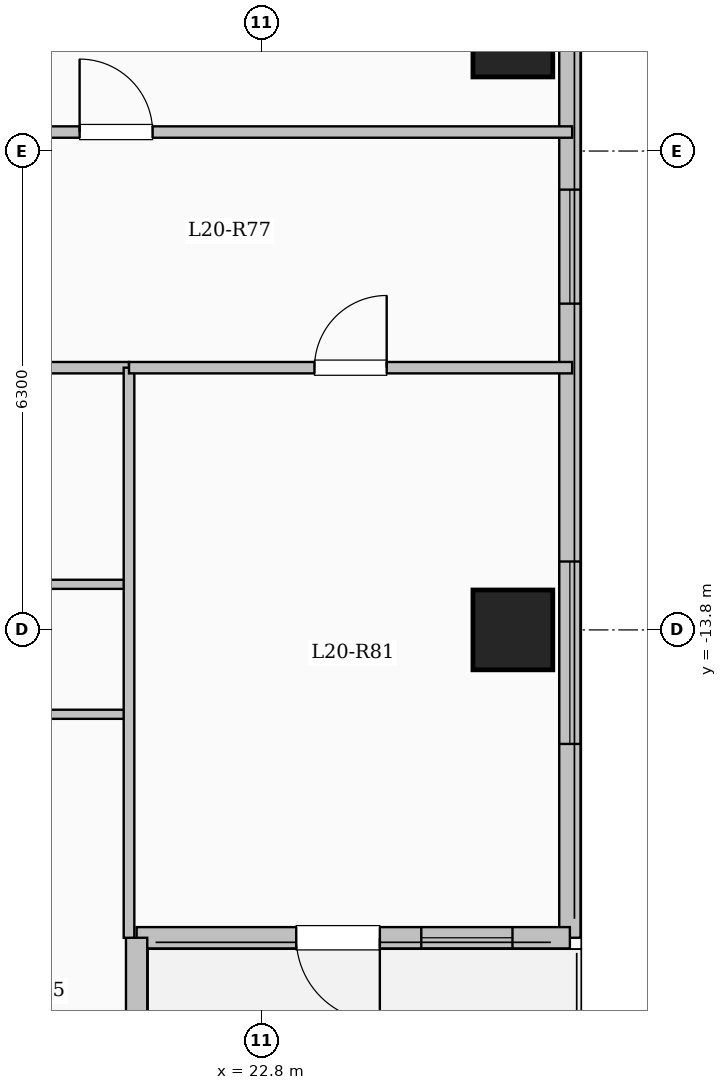
"""IFC4 building model, lengths in metres.
Left out: names, types, materials, properties, quantities, classifications, styles, units other than length and angle.
Written with IfcOpenShell. Run it as: python <this file> out.ifc"""

import sys

from ifc_helpers import new_model, si_unit, direction, frame, frame_2d, origin, origin_2d, place, context, subcontext, project, spatial, rectangle, extrude, element, fill, save


model = new_model("IFC4")
c1 = context("Model", 3, precision=1e-05, world=origin(), true_north=direction((0.0, 1.0)))
c2 = subcontext(c1, "Body", "Model", "MODEL_VIEW")
j1 = project(units=[si_unit("LENGTHUNIT", "METRE"), si_unit("PLANEANGLEUNIT", "RADIAN")], contexts=[c1])
p1 = place(None, origin())
s1 = spatial("IfcSite", under=j1, at=p1, CompositionType="ELEMENT")
p2 = place(p1, origin())
s2 = spatial("IfcBuilding", under=s1, at=p2, CompositionType="ELEMENT")
p3 = place(p2, frame((0.0, 0.0, 78.3)))
s3 = spatial("IfcBuildingStorey", under=s2, at=p3, CompositionType="ELEMENT", Elevation=78.3)
for number, where, z_axis, x_axis in (
    (1, (26.1, -13.8, 0.0), (0.0, 0.0, 1.0), (1.0, 0.0, 0.0)),
    (2, (26.1, -6.0, 0.0), (0.0, 0.0, 1.0), (1.0, 0.0, 0.0)),
):
    element("IfcColumn", number, at=place(p3, frame(where, z_axis=z_axis, x_axis=x_axis)), inside=s3, PredefinedType="COLUMN", context=c2, shape_type="SweptSolid", body=[
        extrude(rectangle(XDim=1.05, YDim=1.05, at=origin_2d()), origin(), (0.0, 0.0, 1.0), 3.35),
    ])
p4 = place(p3, frame((26.85, 17.85, 0.0), z_axis=(0.0, 0.0, 1.0), x_axis=(0.0, -1.0, 0.0)))
e3 = element("IfcWall", 3, at=p4, inside=s3, PredefinedType="SOLIDWALL", context=c2, shape_type="SweptSolid", body=[
    extrude(rectangle(XDim=35.7, YDim=0.28, at=frame_2d((17.85, 0.0))), origin(), (0.0, 0.0, 1.0), 3.1),
])
p5 = place(p4, frame((1.675, 0.0, 0.9)))
e4 = element("IfcOpeningElement", 4, at=p5, cuts=e3, PredefinedType="OPENING", context=c2, shape_type="SweptSolid", body=[
    extrude(rectangle(XDim=2.0, YDim=1.7, at=frame_2d((1.0, 0.85))), frame((0.0, 0.15, 0.0), z_axis=(0.0, -1.0, 0.0), x_axis=(1.0, 0.0, 0.0)), (0.0, 0.0, 1.0), 0.3),
])
p6 = place(p4, frame((5.725, 0.0, 0.95)))
e5 = element("IfcOpeningElement", 5, at=p6, cuts=e3, PredefinedType="OPENING", context=c2, shape_type="SweptSolid", body=[
    extrude(rectangle(XDim=1.0, YDim=1.5, at=frame_2d((0.5, 0.75))), frame((0.0, 0.15, 0.0), z_axis=(0.0, -1.0, 0.0), x_axis=(1.0, 0.0, 0.0)), (0.0, 0.0, 1.0), 0.3),
])
p7 = place(p4, frame((8.975, 0.0, 0.9)))
e6 = element("IfcOpeningElement", 6, at=p7, cuts=e3, PredefinedType="OPENING", context=c2, shape_type="SweptSolid", body=[
    extrude(rectangle(XDim=2.0, YDim=1.7, at=frame_2d((1.0, 0.85))), frame((0.0, 0.15, 0.0), z_axis=(0.0, -1.0, 0.0), x_axis=(1.0, 0.0, 0.0)), (0.0, 0.0, 1.0), 0.3),
])
p8 = place(p4, frame((13.725, 0.0, 0.9)))
e7 = element("IfcOpeningElement", 7, at=p8, cuts=e3, PredefinedType="OPENING", context=c2, shape_type="SweptSolid", body=[
    extrude(rectangle(XDim=1.8, YDim=1.65, at=frame_2d((0.9, 0.825))), frame((0.0, 0.15, 0.0), z_axis=(0.0, -1.0, 0.0), x_axis=(1.0, 0.0, 0.0)), (0.0, 0.0, 1.0), 0.3),
])
p9 = place(p4, frame((19.55, 0.0, 0.9)))
e8 = element("IfcOpeningElement", 8, at=p9, cuts=e3, PredefinedType="OPENING", context=c2, shape_type="SweptSolid", body=[
    extrude(rectangle(XDim=2.4, YDim=1.8, at=frame_2d((1.2, 0.9))), frame((0.0, 0.15, 0.0), z_axis=(0.0, -1.0, 0.0), x_axis=(1.0, 0.0, 0.0)), (0.0, 0.0, 1.0), 0.3),
])
p10 = place(p4, frame((25.857, 0.0, 0.9)))
e9 = element("IfcOpeningElement", 9, at=p10, cuts=e3, PredefinedType="OPENING", context=c2, shape_type="SweptSolid", body=[
    extrude(rectangle(XDim=1.5, YDim=1.65, at=frame_2d((0.75, 0.825))), frame((0.0, 0.15, 0.0), z_axis=(0.0, -1.0, 0.0), x_axis=(1.0, 0.0, 0.0)), (0.0, 0.0, 1.0), 0.3),
])
p11 = place(p4, frame((30.75, 0.0, 0.9)))
e10 = element("IfcOpeningElement", 10, at=p11, cuts=e3, PredefinedType="OPENING", context=c2, shape_type="SweptSolid", body=[
    extrude(rectangle(XDim=2.4, YDim=1.8, at=frame_2d((1.2, 0.9))), frame((0.0, 0.15, 0.0), z_axis=(0.0, -1.0, 0.0), x_axis=(1.0, 0.0, 0.0)), (0.0, 0.0, 1.0), 0.3),
])
p12 = place(p3, frame((26.85, -17.85, 0.0), z_axis=(0.0, 0.0, 1.0), x_axis=(-1.0, 0.0, 0.0)))
e11 = element("IfcWall", 11, at=p12, inside=s3, PredefinedType="SOLIDWALL", context=c2, shape_type="SweptSolid", body=[
    extrude(rectangle(XDim=5.7, YDim=0.28, at=frame_2d((2.85, 0.0))), origin(), (0.0, 0.0, 1.0), 3.1),
])
p13 = place(p12, frame((2.5, 0.0, 0.0)))
e12 = element("IfcOpeningElement", 12, at=p13, cuts=e11, PredefinedType="OPENING", context=c2, shape_type="SweptSolid", body=[
    extrude(rectangle(XDim=1.1, YDim=2.2, at=frame_2d((0.55, 1.1))), frame((0.0, 0.15, 0.0), z_axis=(0.0, -1.0, 0.0), x_axis=(1.0, 0.0, 0.0)), (0.0, 0.0, 1.0), 0.3),
])
p14 = place(p12, frame((0.755, 0.0, 0.95)))
e13 = element("IfcOpeningElement", 13, at=p14, cuts=e11, PredefinedType="OPENING", context=c2, shape_type="SweptSolid", body=[
    extrude(rectangle(XDim=1.2, YDim=1.5, at=frame_2d((0.6, 0.75))), frame((0.0, 0.15, 0.0), z_axis=(0.0, -1.0, 0.0), x_axis=(1.0, 0.0, 0.0)), (0.0, 0.0, 1.0), 0.3),
])
p15 = place(p3, frame((21.15, -17.85, 0.0), z_axis=(0.0, 0.0, 1.0), x_axis=(0.0, -1.0, 0.0)))
e14 = element("IfcWall", 14, at=p15, inside=s3, PredefinedType="SOLIDWALL", context=c2, shape_type="SweptSolid", body=[
    extrude(rectangle(XDim=4.2, YDim=0.28, at=frame_2d((2.1, 0.0))), origin(), (0.0, 0.0, 1.0), 3.1),
])
p16 = place(p15, frame((1.182, 0.0, 0.9)))
e15 = element("IfcOpeningElement", 15, at=p16, cuts=e14, PredefinedType="OPENING", context=c2, shape_type="SweptSolid", body=[
    extrude(rectangle(XDim=1.8, YDim=1.65, at=frame_2d((0.9, 0.825))), frame((0.0, 0.15, 0.0), z_axis=(0.0, -1.0, 0.0), x_axis=(1.0, 0.0, 0.0)), (0.0, 0.0, 1.0), 0.3),
])
p17 = place(p3, frame((8.55, -10.35, 0.0), z_axis=(0.0, 0.0, 1.0), x_axis=(1.0, 0.0, 0.0)))
e16 = element("IfcWall", 16, at=p17, inside=s3, PredefinedType="PARTITIONING", context=c2, shape_type="SweptSolid", body=[
    extrude(rectangle(XDim=12.5, YDim=0.15, at=frame_2d((6.25, 0.0))), origin(), (0.0, 0.0, 1.0), 3.1),
])
p18 = place(p17, frame((0.75, 0.0, 0.0)))
e17 = element("IfcOpeningElement", 17, at=p18, cuts=e16, PredefinedType="OPENING", context=c2, shape_type="SweptSolid", body=[
    extrude(rectangle(XDim=0.96, YDim=2.15, at=frame_2d((0.48, 1.075))), frame((0.0, 0.085, 0.0), z_axis=(0.0, -1.0, 0.0), x_axis=(1.0, 0.0, 0.0)), (0.0, 0.0, 1.0), 0.17),
])
p19 = place(p3, frame((17.165, -13.2, 0.0), z_axis=(0.0, 0.0, 1.0), x_axis=(1.0, 0.0, 0.0)))
e18 = element("IfcWall", 18, at=p19, inside=s3, PredefinedType="PARTITIONING", context=c2, shape_type="SweptSolid", body=[
    extrude(rectangle(XDim=3.885, YDim=0.12, at=frame_2d((1.942, 0.0))), origin(), (0.0, 0.0, 1.0), 3.1),
])
p20 = place(p19, frame((1.503, 0.0, 0.0)))
e19 = element("IfcOpeningElement", 19, at=p20, cuts=e18, PredefinedType="OPENING", context=c2, shape_type="SweptSolid", body=[
    extrude(rectangle(XDim=0.88, YDim=2.1, at=frame_2d((0.44, 1.05))), frame((0.0, 0.07, 0.0), z_axis=(0.0, -1.0, 0.0), x_axis=(1.0, 0.0, 0.0)), (0.0, 0.0, 1.0), 0.14),
])
p21 = place(p3, frame((12.792, -14.91, 0.0), z_axis=(0.0, 0.0, 1.0), x_axis=(1.0, 0.0, 0.0)))
e20 = element("IfcWall", 20, at=p21, inside=s3, PredefinedType="PARTITIONING", context=c2, shape_type="SweptSolid", body=[
    extrude(rectangle(XDim=8.318, YDim=0.12, at=frame_2d((4.159, 0.0))), origin(), (0.0, 0.0, 1.0), 3.1),
])
p22 = place(p21, frame((0.916, 0.0, 0.0)))
e21 = element("IfcOpeningElement", 21, at=p22, cuts=e20, PredefinedType="OPENING", context=c2, shape_type="SweptSolid", body=[
    extrude(rectangle(XDim=0.88, YDim=2.1, at=frame_2d((0.44, 1.05))), frame((0.0, 0.07, 0.0), z_axis=(0.0, -1.0, 0.0), x_axis=(1.0, 0.0, 0.0)), (0.0, 0.0, 1.0), 0.14),
])
p23 = place(p21, frame((3.629, 0.0, 0.0)))
e22 = element("IfcOpeningElement", 22, at=p23, cuts=e20, PredefinedType="OPENING", context=c2, shape_type="SweptSolid", body=[
    extrude(rectangle(XDim=0.88, YDim=2.1, at=frame_2d((0.44, 1.05))), frame((0.0, 0.07, 0.0), z_axis=(0.0, -1.0, 0.0), x_axis=(1.0, 0.0, 0.0)), (0.0, 0.0, 1.0), 0.14),
])
p24 = place(p21, frame((6.342, 0.0, 0.0)))
e23 = element("IfcOpeningElement", 23, at=p24, cuts=e20, PredefinedType="OPENING", context=c2, shape_type="SweptSolid", body=[
    extrude(rectangle(XDim=0.88, YDim=2.1, at=frame_2d((0.44, 1.05))), frame((0.0, 0.07, 0.0), z_axis=(0.0, -1.0, 0.0), x_axis=(1.0, 0.0, 0.0)), (0.0, 0.0, 1.0), 0.14),
])
p25 = place(p3, frame((18.45, -7.25, 0.0), z_axis=(0.0, 0.0, 1.0), x_axis=(1.0, 0.0, 0.0)))
e24 = element("IfcWall", 24, at=p25, inside=s3, PredefinedType="PARTITIONING", context=c2, shape_type="SweptSolid", body=[
    extrude(rectangle(XDim=8.43, YDim=0.15, at=frame_2d((4.215, 0.0))), origin(), (0.0, 0.0, 1.0), 3.1),
])
p26 = place(p25, frame((1.95, 0.0, 0.0)))
e25 = element("IfcOpeningElement", 25, at=p26, cuts=e24, PredefinedType="OPENING", context=c2, shape_type="SweptSolid", body=[
    extrude(rectangle(XDim=0.96, YDim=2.15, at=frame_2d((0.48, 1.075))), frame((0.0, 0.085, 0.0), z_axis=(0.0, -1.0, 0.0), x_axis=(1.0, 0.0, 0.0)), (0.0, 0.0, 1.0), 0.17),
])
p27 = place(p3, frame((21.05, -17.85, 0.0), z_axis=(0.0, 0.0, 1.0), x_axis=(0.0, 1.0, 0.0)))
e26 = element("IfcWall", 26, at=p27, inside=s3, PredefinedType="PARTITIONING", context=c2, shape_type="SweptSolid", body=[
    extrude(rectangle(XDim=7.5, YDim=0.14, at=frame_2d((3.75, 0.0))), origin(), (0.0, 0.0, 1.0), 3.1),
])
p28 = place(p3, frame((21.05, -10.35, 0.0), z_axis=(0.0, 0.0, 1.0), x_axis=(1.0, 0.0, 0.0)))
e27 = element("IfcWall", 27, at=p28, inside=s3, PredefinedType="PARTITIONING", context=c2, shape_type="SweptSolid", body=[
    extrude(rectangle(XDim=5.83, YDim=0.15, at=frame_2d((2.915, 0.0))), origin(), (0.0, 0.0, 1.0), 3.1),
])
p29 = place(p28, frame((2.44, 0.0, 0.0)))
e28 = element("IfcOpeningElement", 28, at=p29, cuts=e27, PredefinedType="OPENING", context=c2, shape_type="SweptSolid", body=[
    extrude(rectangle(XDim=0.95, YDim=2.15, at=frame_2d((0.475, 1.075))), frame((0.0, 0.085, 0.0), z_axis=(0.0, -1.0, 0.0), x_axis=(1.0, 0.0, 0.0)), (0.0, 0.0, 1.0), 0.17),
])
p30 = place(p10, origin())
e29 = element("IfcWindow", 29, at=p30, inside=s3, PartitioningType="SINGLE_PANEL", PredefinedType="WINDOW", context=c2, shape_type="SweptSolid", body=[
    extrude(rectangle(XDim=1.5, YDim=1.65, at=frame_2d((0.75, 0.825))), frame((0.0, 0.03, 0.0), z_axis=(0.0, -1.0, 0.0), x_axis=(1.0, 0.0, 0.0)), (0.0, 0.0, 1.0), 0.06),
])
fill(e9, e29)
p31 = place(p11, origin())
e30 = element("IfcWindow", 30, at=p31, inside=s3, PartitioningType="SINGLE_PANEL", PredefinedType="WINDOW", context=c2, shape_type="SweptSolid", body=[
    extrude(rectangle(XDim=2.4, YDim=1.8, at=frame_2d((1.2, 0.9))), frame((0.0, 0.03, 0.0), z_axis=(0.0, -1.0, 0.0), x_axis=(1.0, 0.0, 0.0)), (0.0, 0.0, 1.0), 0.06),
])
fill(e10, e30)
p32 = place(p13, origin())
e31 = element("IfcDoor", 31, at=p32, inside=s3, OperationType="SINGLE_SWING_LEFT", PredefinedType="DOOR", context=c2, shape_type="SweptSolid", body=[
    extrude(rectangle(XDim=1.1, YDim=2.2, at=frame_2d((0.55, 1.1))), frame((0.0, 0.025, 0.0), z_axis=(0.0, -1.0, 0.0), x_axis=(1.0, 0.0, 0.0)), (0.0, 0.0, 1.0), 0.05),
])
fill(e12, e31)
p33 = place(p14, origin())
e32 = element("IfcWindow", 32, at=p33, inside=s3, PartitioningType="SINGLE_PANEL", PredefinedType="WINDOW", context=c2, shape_type="SweptSolid", body=[
    extrude(rectangle(XDim=1.2, YDim=1.5, at=frame_2d((0.6, 0.75))), frame((0.0, 0.03, 0.0), z_axis=(0.0, -1.0, 0.0), x_axis=(1.0, 0.0, 0.0)), (0.0, 0.0, 1.0), 0.06),
])
fill(e13, e32)
p34 = place(p29, origin())
e33 = element("IfcDoor", 33, at=p34, inside=s3, OperationType="SINGLE_SWING_RIGHT", PredefinedType="DOOR", context=c2, shape_type="SweptSolid", body=[
    extrude(rectangle(XDim=0.95, YDim=2.15, at=frame_2d((0.475, 1.075))), frame((0.0, 0.025, 0.0), z_axis=(0.0, -1.0, 0.0), x_axis=(1.0, 0.0, 0.0)), (0.0, 0.0, 1.0), 0.05),
])
fill(e28, e33)
p35 = place(p26, origin())
e34 = element("IfcDoor", 34, at=p35, inside=s3, OperationType="SINGLE_SWING_LEFT", PredefinedType="DOOR", context=c2, shape_type="SweptSolid", body=[
    extrude(rectangle(XDim=0.96, YDim=2.15, at=frame_2d((0.48, 1.075))), frame((0.0, 0.025, 0.0), z_axis=(0.0, -1.0, 0.0), x_axis=(1.0, 0.0, 0.0)), (0.0, 0.0, 1.0), 0.05),
])
fill(e25, e34)
save(model, sys.argv[1])
